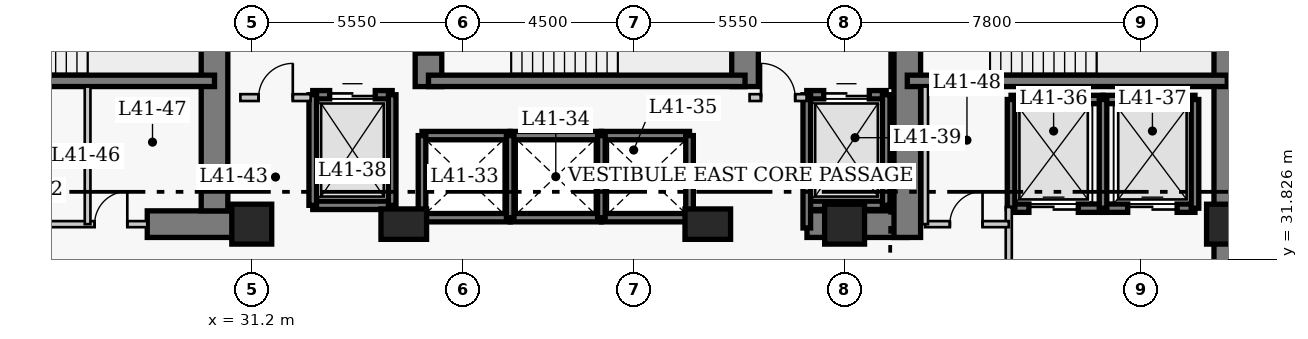
"""IFC4 building model, lengths in metres.
Left out: names, types, materials, properties, quantities, classifications, styles, units other than length and angle.
Written with IfcOpenShell. Run it as: python <this file> out.ifc"""

import sys

from ifc_helpers import new_model, si_unit, direction, frame, frame_2d, origin, origin_2d, place, context, subcontext, project, spatial, rectangle, extrude, element, fill, save


model = new_model("IFC4")
c1 = context("Model", 3, precision=1e-05, world=origin(), true_north=direction((0.0, 1.0)))
c2 = subcontext(c1, "Body", "Model", "MODEL_VIEW")
j1 = project(units=[si_unit("LENGTHUNIT", "METRE"), si_unit("PLANEANGLEUNIT", "RADIAN")], contexts=[c1])
p1 = place(None, origin())
s1 = spatial("IfcSite", under=j1, at=p1, CompositionType="ELEMENT")
p2 = place(p1, origin())
s2 = spatial("IfcBuilding", under=s1, at=p2, CompositionType="ELEMENT")
p3 = place(p2, frame((0.0, 0.0, 165.0)))
s3 = spatial("IfcBuildingStorey", under=s2, at=p3, CompositionType="ELEMENT", Elevation=165.0)
p4 = place(p3, frame((56.87, 27.05, 0.0), z_axis=(0.0, 0.0, 1.0), x_axis=(0.0, 1.0, 0.0)))
e1 = element("IfcWall", 1, at=p4, inside=s3, PredefinedType="SHEAR", context=c2, shape_type="SweptSolid", body=[
    extrude(rectangle(XDim=13.62, YDim=0.7, at=frame_2d((6.81, 0.0))), origin(), (0.0, 0.0, 1.0), 3.8),
])
p5 = place(p3, frame((28.45, 32.75, 0.0), z_axis=(0.0, 0.0, 1.0), x_axis=(1.0, 0.0, 0.0)))
e2 = element("IfcWall", 2, at=p5, inside=s3, PredefinedType="SHEAR", context=c2, shape_type="SweptSolid", body=[
    extrude(rectangle(XDim=2.4, YDim=0.7, at=frame_2d((1.2, 0.0))), origin(), (0.0, 0.0, 1.0), 3.8),
])
p6 = place(p3, frame((45.81, 32.75, 0.0), z_axis=(0.0, 0.0, 1.0), x_axis=(1.0, 0.0, 0.0)))
e3 = element("IfcWall", 3, at=p6, inside=s3, PredefinedType="SHEAR", context=c2, shape_type="SweptSolid", body=[
    extrude(rectangle(XDim=2.64, YDim=0.7, at=frame_2d((1.32, 0.0))), origin(), (0.0, 0.0, 1.0), 3.8),
])
p7 = place(p3, frame((30.22, 33.1, 0.0), z_axis=(0.0, 0.0, 1.0), x_axis=(0.0, 1.0, 0.0)))
e4 = element("IfcWall", 4, at=p7, inside=s3, PredefinedType="SHEAR", context=c2, shape_type="SweptSolid", body=[
    extrude(rectangle(XDim=7.22, YDim=0.7, at=frame_2d((3.61, 0.0))), origin(), (0.0, 0.0, 1.0), 3.8),
])
p8 = place(p3, frame((35.85, 36.37, 0.0), z_axis=(0.0, 0.0, 1.0), x_axis=(0.0, 1.0, 0.0)))
e5 = element("IfcWall", 5, at=p8, inside=s3, PredefinedType="SHEAR", context=c2, shape_type="SweptSolid", body=[
    extrude(rectangle(XDim=3.95, YDim=0.7, at=frame_2d((1.975, 0.0))), origin(), (0.0, 0.0, 1.0), 3.8),
])
p9 = place(p8, frame((0.88, 0.0, 0.0)))
e6 = element("IfcOpeningElement", 6, at=p9, cuts=e5, PredefinedType="OPENING", context=c2, shape_type="SweptSolid", body=[
    extrude(rectangle(XDim=1.1, YDim=2.15, at=frame_2d((0.55, 1.075))), frame((0.0, 0.36, 0.0), z_axis=(0.0, -1.0, 0.0), x_axis=(1.0, 0.0, 0.0)), (0.0, 0.0, 1.0), 0.72),
])
p10 = place(p3, frame((44.18, 36.37, 0.0), z_axis=(0.0, 0.0, 1.0), x_axis=(0.0, 1.0, 0.0)))
e7 = element("IfcWall", 7, at=p10, inside=s3, PredefinedType="SHEAR", context=c2, shape_type="SweptSolid", body=[
    extrude(rectangle(XDim=3.95, YDim=0.7, at=frame_2d((1.975, 0.0))), origin(), (0.0, 0.0, 1.0), 3.8),
])
p11 = place(p3, frame((48.45, 32.4, 0.0), z_axis=(0.0, 0.0, 1.0), x_axis=(0.0, 1.0, 0.0)))
e8 = element("IfcWall", 8, at=p11, inside=s3, PredefinedType="SHEAR", context=c2, shape_type="SweptSolid", body=[
    extrude(rectangle(XDim=7.92, YDim=0.7, at=frame_2d((3.96, 0.0))), origin(), (0.0, 0.0, 1.0), 3.8),
])
p12 = place(p11, frame((5.8, 0.0, 0.0)))
e9 = element("IfcOpeningElement", 9, at=p12, cuts=e8, PredefinedType="OPENING", context=c2, shape_type="SweptSolid", body=[
    extrude(rectangle(XDim=1.1, YDim=2.15, at=frame_2d((0.55, 1.075))), frame((0.0, 0.36, 0.0), z_axis=(0.0, -1.0, 0.0), x_axis=(1.0, 0.0, 0.0)), (0.0, 0.0, 1.0), 0.72),
])
p13 = place(p3, frame((21.9, 36.52, 0.0), z_axis=(0.0, 0.0, 1.0), x_axis=(1.0, 0.0, 0.0)))
e10 = element("IfcWall", 10, at=p13, inside=s3, PredefinedType="SHEAR", context=c2, shape_type="SweptSolid", body=[
    extrude(rectangle(XDim=8.32, YDim=0.3, at=frame_2d((4.16, 0.0))), origin(), (0.0, 0.0, 1.0), 3.8),
])
p14 = place(p13, frame((0.9, 0.0, 0.0)))
e11 = element("IfcOpeningElement", 11, at=p14, cuts=e10, PredefinedType="OPENING", context=c2, shape_type="SweptSolid", body=[
    extrude(rectangle(XDim=1.1, YDim=2.15, at=frame_2d((0.55, 1.075))), frame((0.0, 0.16, 0.0), z_axis=(0.0, -1.0, 0.0), x_axis=(1.0, 0.0, 0.0)), (0.0, 0.0, 1.0), 0.32),
])
p15 = place(p3, frame((35.85, 36.52, 0.0), z_axis=(0.0, 0.0, 1.0), x_axis=(1.0, 0.0, 0.0)))
e12 = element("IfcWall", 12, at=p15, inside=s3, PredefinedType="SHEAR", context=c2, shape_type="SweptSolid", body=[
    extrude(rectangle(XDim=8.33, YDim=0.3, at=frame_2d((4.165, 0.0))), origin(), (0.0, 0.0, 1.0), 3.8),
])
p16 = place(p3, frame((48.45, 36.52, 0.0), z_axis=(0.0, 0.0, 1.0), x_axis=(1.0, 0.0, 0.0)))
e13 = element("IfcWall", 13, at=p16, inside=s3, PredefinedType="SHEAR", context=c2, shape_type="SweptSolid", body=[
    extrude(rectangle(XDim=8.42, YDim=0.3, at=frame_2d((4.21, 0.0))), origin(), (0.0, 0.0, 1.0), 3.8),
])
p17 = place(p3, frame((31.2, 32.75, 0.0), z_axis=(0.0, 0.0, 1.0), x_axis=(1.0, 0.0, 0.0)))
e14 = element("IfcColumn", 14, at=p17, inside=s3, PredefinedType="COLUMN", context=c2, shape_type="SweptSolid", body=[
    extrude(rectangle(XDim=1.05, YDim=1.05, at=origin_2d()), origin(), (0.0, 0.0, 1.0), 3.8),
])
for number, where, z_axis, x_axis in (
    (15, (35.2, 32.75, 0.0), (0.0, 0.0, 1.0), (1.0, 0.0, 0.0)),
    (16, (43.2, 32.75, 0.0), (0.0, 0.0, 1.0), (1.0, 0.0, 0.0)),
):
    element("IfcColumn", number, at=place(p3, frame(where, z_axis=z_axis, x_axis=x_axis)), inside=s3, PredefinedType="COLUMN", context=c2, shape_type="SweptSolid", body=[
        extrude(rectangle(XDim=1.2, YDim=0.8, at=origin_2d()), origin(), (0.0, 0.0, 1.0), 3.8),
    ])
for number, where, z_axis, x_axis in (
    (17, (46.8, 32.75, 0.0), (0.0, 0.0, 1.0), (1.0, 0.0, 0.0)),
    (18, (56.85, 32.75, 0.0), (0.0, 0.0, 1.0), (1.0, 0.0, 0.0)),
):
    element("IfcColumn", number, at=place(p3, frame(where, z_axis=z_axis, x_axis=x_axis)), inside=s3, PredefinedType="COLUMN", context=c2, shape_type="SweptSolid", body=[
        extrude(rectangle(XDim=1.05, YDim=1.05, at=origin_2d()), origin(), (0.0, 0.0, 1.0), 3.8),
    ])
for number, where, z_axis, x_axis in (
    (19, (35.68, 35.08, 0.0), (0.0, 0.0, 1.0), (1.0, 0.0, 0.0)),
    (20, (35.68, 32.92, 0.0), (0.0, 0.0, 1.0), (1.0, 0.0, 0.0)),
):
    element("IfcWall", number, at=place(p3, frame(where, z_axis=z_axis, x_axis=x_axis)), inside=s3, PredefinedType="SHEAR", context=c2, shape_type="SweptSolid", body=[
        extrude(rectangle(XDim=2.32, YDim=0.22, at=frame_2d((1.16, 0.0))), origin(), (0.0, 0.0, 1.0), 3.8),
    ])
p18 = place(p3, frame((35.68, 32.92, 0.0), z_axis=(0.0, 0.0, 1.0), x_axis=(0.0, 1.0, 0.0)))
e21 = element("IfcWall", 21, at=p18, inside=s3, PredefinedType="SHEAR", context=c2, shape_type="SweptSolid", body=[
    extrude(rectangle(XDim=2.16, YDim=0.2, at=frame_2d((1.08, 0.0))), origin(), (0.0, 0.0, 1.0), 3.8),
])
for number, where, z_axis, x_axis in (
    (22, (38.0, 35.08, 0.0), (0.0, 0.0, 1.0), (1.0, 0.0, 0.0)),
    (23, (38.0, 32.92, 0.0), (0.0, 0.0, 1.0), (1.0, 0.0, 0.0)),
):
    element("IfcWall", number, at=place(p3, frame(where, z_axis=z_axis, x_axis=x_axis)), inside=s3, PredefinedType="SHEAR", context=c2, shape_type="SweptSolid", body=[
        extrude(rectangle(XDim=2.4, YDim=0.22, at=frame_2d((1.2, 0.0))), origin(), (0.0, 0.0, 1.0), 3.8),
    ])
p19 = place(p3, frame((38.0, 32.92, 0.0), z_axis=(0.0, 0.0, 1.0), x_axis=(0.0, 1.0, 0.0)))
e24 = element("IfcWall", 24, at=p19, inside=s3, PredefinedType="SHEAR", context=c2, shape_type="SweptSolid", body=[
    extrude(rectangle(XDim=2.16, YDim=0.2, at=frame_2d((1.08, 0.0))), origin(), (0.0, 0.0, 1.0), 3.8),
])
for number, where, z_axis, x_axis in (
    (25, (40.4, 35.08, 0.0), (0.0, 0.0, 1.0), (1.0, 0.0, 0.0)),
    (26, (40.4, 32.92, 0.0), (0.0, 0.0, 1.0), (1.0, 0.0, 0.0)),
):
    element("IfcWall", number, at=place(p3, frame(where, z_axis=z_axis, x_axis=x_axis)), inside=s3, PredefinedType="SHEAR", context=c2, shape_type="SweptSolid", body=[
        extrude(rectangle(XDim=2.32, YDim=0.22, at=frame_2d((1.16, 0.0))), origin(), (0.0, 0.0, 1.0), 3.8),
    ])
for number, where, z_axis, x_axis in (
    (27, (40.4, 32.92, 0.0), (0.0, 0.0, 1.0), (0.0, 1.0, 0.0)),
    (28, (42.72, 32.92, 0.0), (0.0, 0.0, 1.0), (0.0, 1.0, 0.0)),
):
    element("IfcWall", number, at=place(p3, frame(where, z_axis=z_axis, x_axis=x_axis)), inside=s3, PredefinedType="SHEAR", context=c2, shape_type="SweptSolid", body=[
        extrude(rectangle(XDim=2.16, YDim=0.2, at=frame_2d((1.08, 0.0))), origin(), (0.0, 0.0, 1.0), 3.8),
    ])
p20 = place(p3, frame((51.18, 36.03, 0.0), z_axis=(0.0, 0.0, 1.0), x_axis=(1.0, 0.0, 0.0)))
e29 = element("IfcWall", 29, at=p20, inside=s3, PredefinedType="SHEAR", context=c2, shape_type="SweptSolid", body=[
    extrude(rectangle(XDim=2.42, YDim=0.22, at=frame_2d((1.21, 0.0))), origin(), (0.0, 0.0, 1.0), 3.8),
])
p21 = place(p3, frame((51.18, 33.17, 0.0), z_axis=(0.0, 0.0, 1.0), x_axis=(1.0, 0.0, 0.0)))
e30 = element("IfcWall", 30, at=p21, inside=s3, PredefinedType="SHEAR", context=c2, shape_type="SweptSolid", body=[
    extrude(rectangle(XDim=2.42, YDim=0.22, at=frame_2d((1.21, 0.0))), origin(), (0.0, 0.0, 1.0), 3.8),
])
p22 = place(p21, frame((0.47, 0.0, 0.0)))
e31 = element("IfcOpeningElement", 31, at=p22, cuts=e30, PredefinedType="OPENING", context=c2, shape_type="SweptSolid", body=[
    extrude(rectangle(XDim=1.3, YDim=2.15, at=frame_2d((0.65, 1.075))), frame((0.0, 0.12, 0.0), z_axis=(0.0, -1.0, 0.0), x_axis=(1.0, 0.0, 0.0)), (0.0, 0.0, 1.0), 0.24),
])
p23 = place(p3, frame((51.18, 33.17, 0.0), z_axis=(0.0, 0.0, 1.0), x_axis=(0.0, 1.0, 0.0)))
e32 = element("IfcWall", 32, at=p23, inside=s3, PredefinedType="SHEAR", context=c2, shape_type="SweptSolid", body=[
    extrude(rectangle(XDim=2.86, YDim=0.2, at=frame_2d((1.43, 0.0))), origin(), (0.0, 0.0, 1.0), 3.8),
])
p24 = place(p3, frame((53.6, 36.03, 0.0), z_axis=(0.0, 0.0, 1.0), x_axis=(1.0, 0.0, 0.0)))
e33 = element("IfcWall", 33, at=p24, inside=s3, PredefinedType="SHEAR", context=c2, shape_type="SweptSolid", body=[
    extrude(rectangle(XDim=2.42, YDim=0.22, at=frame_2d((1.21, 0.0))), origin(), (0.0, 0.0, 1.0), 3.8),
])
p25 = place(p3, frame((53.6, 33.17, 0.0), z_axis=(0.0, 0.0, 1.0), x_axis=(1.0, 0.0, 0.0)))
e34 = element("IfcWall", 34, at=p25, inside=s3, PredefinedType="SHEAR", context=c2, shape_type="SweptSolid", body=[
    extrude(rectangle(XDim=2.42, YDim=0.22, at=frame_2d((1.21, 0.0))), origin(), (0.0, 0.0, 1.0), 3.8),
])
p26 = place(p25, frame((0.65, 0.0, 0.0)))
e35 = element("IfcOpeningElement", 35, at=p26, cuts=e34, PredefinedType="OPENING", context=c2, shape_type="SweptSolid", body=[
    extrude(rectangle(XDim=1.3, YDim=2.15, at=frame_2d((0.65, 1.075))), frame((0.0, 0.12, 0.0), z_axis=(0.0, -1.0, 0.0), x_axis=(1.0, 0.0, 0.0)), (0.0, 0.0, 1.0), 0.24),
])
for number, where, z_axis, x_axis in (
    (36, (53.6, 33.17, 0.0), (0.0, 0.0, 1.0), (0.0, 1.0, 0.0)),
    (37, (56.02, 33.17, 0.0), (0.0, 0.0, 1.0), (0.0, 1.0, 0.0)),
):
    element("IfcWall", number, at=place(p3, frame(where, z_axis=z_axis, x_axis=x_axis)), inside=s3, PredefinedType="SHEAR", context=c2, shape_type="SweptSolid", body=[
        extrude(rectangle(XDim=2.86, YDim=0.2, at=frame_2d((1.43, 0.0))), origin(), (0.0, 0.0, 1.0), 3.8),
    ])
p27 = place(p3, frame((32.805, 36.155, 0.0), z_axis=(0.0, 0.0, 1.0), x_axis=(1.0, 0.0, 0.0)))
e38 = element("IfcWall", 38, at=p27, inside=s3, PredefinedType="SHEAR", context=c2, shape_type="SweptSolid", body=[
    extrude(rectangle(XDim=2.09, YDim=0.22, at=frame_2d((1.045, 0.0))), origin(), (0.0, 0.0, 1.0), 3.8),
])
p28 = place(p27, frame((0.445, 0.0, 0.0)))
e39 = element("IfcOpeningElement", 39, at=p28, cuts=e38, PredefinedType="OPENING", context=c2, shape_type="SweptSolid", body=[
    extrude(rectangle(XDim=1.2, YDim=2.15, at=frame_2d((0.6, 1.075))), frame((0.0, 0.12, 0.0), z_axis=(0.0, -1.0, 0.0), x_axis=(1.0, 0.0, 0.0)), (0.0, 0.0, 1.0), 0.24),
])
p29 = place(p3, frame((32.805, 33.245, 0.0), z_axis=(0.0, 0.0, 1.0), x_axis=(1.0, 0.0, 0.0)))
e40 = element("IfcWall", 40, at=p29, inside=s3, PredefinedType="SHEAR", context=c2, shape_type="SweptSolid", body=[
    extrude(rectangle(XDim=2.09, YDim=0.22, at=frame_2d((1.045, 0.0))), origin(), (0.0, 0.0, 1.0), 3.8),
])
for number, where, z_axis, x_axis in (
    (41, (32.805, 33.245, 0.0), (0.0, 0.0, 1.0), (0.0, 1.0, 0.0)),
    (42, (34.895, 33.245, 0.0), (0.0, 0.0, 1.0), (0.0, 1.0, 0.0)),
):
    element("IfcWall", number, at=place(p3, frame(where, z_axis=z_axis, x_axis=x_axis)), inside=s3, PredefinedType="SHEAR", context=c2, shape_type="SweptSolid", body=[
        extrude(rectangle(XDim=2.91, YDim=0.2, at=frame_2d((1.455, 0.0))), origin(), (0.0, 0.0, 1.0), 3.8),
    ])
p30 = place(p3, frame((45.805, 36.155, 0.0), z_axis=(0.0, 0.0, 1.0), x_axis=(1.0, 0.0, 0.0)))
e43 = element("IfcWall", 43, at=p30, inside=s3, PredefinedType="SHEAR", context=c2, shape_type="SweptSolid", body=[
    extrude(rectangle(XDim=2.09, YDim=0.22, at=frame_2d((1.045, 0.0))), origin(), (0.0, 0.0, 1.0), 3.8),
])
p31 = place(p30, frame((0.445, 0.0, 0.0)))
e44 = element("IfcOpeningElement", 44, at=p31, cuts=e43, PredefinedType="OPENING", context=c2, shape_type="SweptSolid", body=[
    extrude(rectangle(XDim=1.2, YDim=2.15, at=frame_2d((0.6, 1.075))), frame((0.0, 0.12, 0.0), z_axis=(0.0, -1.0, 0.0), x_axis=(1.0, 0.0, 0.0)), (0.0, 0.0, 1.0), 0.24),
])
p32 = place(p3, frame((45.805, 33.245, 0.0), z_axis=(0.0, 0.0, 1.0), x_axis=(1.0, 0.0, 0.0)))
e45 = element("IfcWall", 45, at=p32, inside=s3, PredefinedType="SHEAR", context=c2, shape_type="SweptSolid", body=[
    extrude(rectangle(XDim=2.09, YDim=0.22, at=frame_2d((1.045, 0.0))), origin(), (0.0, 0.0, 1.0), 3.8),
])
p33 = place(p3, frame((45.805, 32.65, 0.0), z_axis=(0.0, 0.0, 1.0), x_axis=(0.0, 1.0, 0.0)))
e46 = element("IfcWall", 46, at=p33, inside=s3, PredefinedType="SHEAR", context=c2, shape_type="SweptSolid", body=[
    extrude(rectangle(XDim=3.505, YDim=0.2, at=frame_2d((1.752, 0.0))), origin(), (0.0, 0.0, 1.0), 3.8),
])
p34 = place(p3, frame((47.895, 33.245, 0.0), z_axis=(0.0, 0.0, 1.0), x_axis=(0.0, 1.0, 0.0)))
e47 = element("IfcWall", 47, at=p34, inside=s3, PredefinedType="SHEAR", context=c2, shape_type="SweptSolid", body=[
    extrude(rectangle(XDim=2.91, YDim=0.2, at=frame_2d((1.455, 0.0))), origin(), (0.0, 0.0, 1.0), 3.8),
])
p35 = place(p3, frame((30.9, 36.08, 0.0), z_axis=(0.0, 0.0, 1.0), x_axis=(1.0, 0.0, 0.0)))
e48 = element("IfcWall", 48, at=p35, inside=s3, PredefinedType="PARTITIONING", context=c2, shape_type="SweptSolid", body=[
    extrude(rectangle(XDim=1.85, YDim=0.18, at=frame_2d((0.925, 0.0))), origin(), (0.0, 0.0, 1.0), 3.55),
])
p36 = place(p35, frame((0.48, 0.0, 0.0)))
e49 = element("IfcOpeningElement", 49, at=p36, cuts=e48, PredefinedType="OPENING", context=c2, shape_type="SweptSolid", body=[
    extrude(rectangle(XDim=0.9, YDim=2.15, at=frame_2d((0.45, 1.075))), frame((0.0, 0.1, 0.0), z_axis=(0.0, -1.0, 0.0), x_axis=(1.0, 0.0, 0.0)), (0.0, 0.0, 1.0), 0.2),
])
p37 = place(p3, frame((44.3, 36.08, 0.0), z_axis=(0.0, 0.0, 1.0), x_axis=(1.0, 0.0, 0.0)))
e50 = element("IfcWall", 50, at=p37, inside=s3, PredefinedType="PARTITIONING", context=c2, shape_type="SweptSolid", body=[
    extrude(rectangle(XDim=1.5, YDim=0.18, at=frame_2d((0.75, 0.0))), origin(), (0.0, 0.0, 1.0), 3.55),
])
p38 = place(p37, frame((0.3, 0.0, 0.0)))
e51 = element("IfcOpeningElement", 51, at=p38, cuts=e50, PredefinedType="OPENING", context=c2, shape_type="SweptSolid", body=[
    extrude(rectangle(XDim=0.9, YDim=2.15, at=frame_2d((0.45, 1.075))), frame((0.0, 0.1, 0.0), z_axis=(0.0, -1.0, 0.0), x_axis=(1.0, 0.0, 0.0)), (0.0, 0.0, 1.0), 0.2),
])
p39 = place(p3, frame((51.12, 29.5, 0.0), z_axis=(0.0, 0.0, 1.0), x_axis=(0.0, 1.0, 0.0)))
e52 = element("IfcWall", 52, at=p39, inside=s3, PredefinedType="PARTITIONING", context=c2, shape_type="SweptSolid", body=[
    extrude(rectangle(XDim=3.7, YDim=0.16, at=frame_2d((1.85, 0.0))), origin(), (0.0, 0.0, 1.0), 3.55),
])
p40 = place(p39, frame((0.9, 0.0, 0.0)))
e53 = element("IfcOpeningElement", 53, at=p40, cuts=e52, PredefinedType="OPENING", context=c2, shape_type="SweptSolid", body=[
    extrude(rectangle(XDim=1.1, YDim=2.15, at=frame_2d((0.55, 1.075))), frame((0.0, 0.09, 0.0), z_axis=(0.0, -1.0, 0.0), x_axis=(1.0, 0.0, 0.0)), (0.0, 0.0, 1.0), 0.18),
])
p41 = place(p3, frame((24.48, 32.75, 0.0), z_axis=(0.0, 0.0, 1.0), x_axis=(1.0, 0.0, 0.0)))
e54 = element("IfcWall", 54, at=p41, inside=s3, PredefinedType="PARTITIONING", context=c2, shape_type="SweptSolid", body=[
    extrude(rectangle(XDim=3.97, YDim=0.16, at=frame_2d((1.985, 0.0))), origin(), (0.0, 0.0, 1.0), 3.55),
])
p42 = place(p41, frame((2.585, 0.0, 0.0)))
e55 = element("IfcOpeningElement", 55, at=p42, cuts=e54, PredefinedType="OPENING", context=c2, shape_type="SweptSolid", body=[
    extrude(rectangle(XDim=0.86, YDim=2.05, at=frame_2d((0.43, 1.025))), frame((0.0, 0.09, 0.0), z_axis=(0.0, -1.0, 0.0), x_axis=(1.0, 0.0, 0.0)), (0.0, 0.0, 1.0), 0.18),
])
p43 = place(p3, frame((48.92, 32.75, 0.0), z_axis=(0.0, 0.0, 1.0), x_axis=(1.0, 0.0, 0.0)))
e56 = element("IfcWall", 56, at=p43, inside=s3, PredefinedType="PARTITIONING", context=c2, shape_type="SweptSolid", body=[
    extrude(rectangle(XDim=2.2, YDim=0.16, at=frame_2d((1.1, 0.0))), origin(), (0.0, 0.0, 1.0), 3.55),
])
p44 = place(p43, frame((0.65, 0.0, 0.0)))
e57 = element("IfcOpeningElement", 57, at=p44, cuts=e56, PredefinedType="OPENING", context=c2, shape_type="SweptSolid", body=[
    extrude(rectangle(XDim=0.86, YDim=2.05, at=frame_2d((0.43, 1.025))), frame((0.0, 0.09, 0.0), z_axis=(0.0, -1.0, 0.0), x_axis=(1.0, 0.0, 0.0)), (0.0, 0.0, 1.0), 0.18),
])
for number, where, z_axis, x_axis in (
    (58, (48.92, 32.75, 0.0), (0.0, 0.0, 1.0), (0.0, 1.0, 0.0)),
    (59, (26.88, 32.75, 0.0), (0.0, 0.0, 1.0), (0.0, 1.0, 0.0)),
):
    element("IfcWall", number, at=place(p3, frame(where, z_axis=z_axis, x_axis=x_axis)), inside=s3, PredefinedType="PARTITIONING", context=c2, shape_type="SweptSolid", body=[
        extrude(rectangle(XDim=3.62, YDim=0.15, at=frame_2d((1.81, 0.0))), origin(), (0.0, 0.0, 1.0), 3.55),
    ])
p45 = place(p22, origin())
e60 = element("IfcDoor", 60, at=p45, inside=s3, OperationType="DOUBLE_DOOR_SLIDING", PredefinedType="DOOR", context=c2, shape_type="SweptSolid", body=[
    extrude(rectangle(XDim=1.3, YDim=2.15, at=frame_2d((0.65, 1.075))), frame((0.0, 0.025, 0.0), z_axis=(0.0, -1.0, 0.0), x_axis=(1.0, 0.0, 0.0)), (0.0, 0.0, 1.0), 0.05),
])
fill(e31, e60)
p46 = place(p26, origin())
e61 = element("IfcDoor", 61, at=p46, inside=s3, OperationType="DOUBLE_DOOR_SLIDING", PredefinedType="DOOR", context=c2, shape_type="SweptSolid", body=[
    extrude(rectangle(XDim=1.3, YDim=2.15, at=frame_2d((0.65, 1.075))), frame((0.0, 0.025, 0.0), z_axis=(0.0, -1.0, 0.0), x_axis=(1.0, 0.0, 0.0)), (0.0, 0.0, 1.0), 0.05),
])
fill(e35, e61)
p47 = place(p28, origin())
e62 = element("IfcDoor", 62, at=p47, inside=s3, OperationType="DOUBLE_DOOR_SLIDING", PredefinedType="DOOR", context=c2, shape_type="SweptSolid", body=[
    extrude(rectangle(XDim=1.2, YDim=2.15, at=frame_2d((0.6, 1.075))), frame((0.0, 0.025, 0.0), z_axis=(0.0, -1.0, 0.0), x_axis=(1.0, 0.0, 0.0)), (0.0, 0.0, 1.0), 0.05),
])
fill(e39, e62)
p48 = place(p31, origin())
e63 = element("IfcDoor", 63, at=p48, inside=s3, OperationType="DOUBLE_DOOR_SLIDING", PredefinedType="DOOR", context=c2, shape_type="SweptSolid", body=[
    extrude(rectangle(XDim=1.2, YDim=2.15, at=frame_2d((0.6, 1.075))), frame((0.0, 0.025, 0.0), z_axis=(0.0, -1.0, 0.0), x_axis=(1.0, 0.0, 0.0)), (0.0, 0.0, 1.0), 0.05),
])
fill(e44, e63)
p49 = place(p36, origin())
e64 = element("IfcDoor", 64, at=p49, inside=s3, OperationType="SINGLE_SWING_RIGHT", PredefinedType="DOOR", context=c2, shape_type="SweptSolid", body=[
    extrude(rectangle(XDim=0.9, YDim=2.15, at=frame_2d((0.45, 1.075))), frame((0.0, 0.025, 0.0), z_axis=(0.0, -1.0, 0.0), x_axis=(1.0, 0.0, 0.0)), (0.0, 0.0, 1.0), 0.05),
])
fill(e49, e64)
p50 = place(p38, origin())
e65 = element("IfcDoor", 65, at=p50, inside=s3, OperationType="SINGLE_SWING_LEFT", PredefinedType="DOOR", context=c2, shape_type="SweptSolid", body=[
    extrude(rectangle(XDim=0.9, YDim=2.15, at=frame_2d((0.45, 1.075))), frame((0.0, 0.025, 0.0), z_axis=(0.0, -1.0, 0.0), x_axis=(1.0, 0.0, 0.0)), (0.0, 0.0, 1.0), 0.05),
])
fill(e51, e65)
p51 = place(p42, origin())
e66 = element("IfcDoor", 66, at=p51, inside=s3, OperationType="SINGLE_SWING_RIGHT", PredefinedType="DOOR", context=c2, shape_type="SweptSolid", body=[
    extrude(rectangle(XDim=0.86, YDim=2.05, at=frame_2d((0.43, 1.025))), frame((0.0, 0.025, 0.0), z_axis=(0.0, -1.0, 0.0), x_axis=(1.0, 0.0, 0.0)), (0.0, 0.0, 1.0), 0.05),
])
fill(e55, e66)
p52 = place(p44, origin())
e67 = element("IfcDoor", 67, at=p52, inside=s3, OperationType="SINGLE_SWING_RIGHT", PredefinedType="DOOR", context=c2, shape_type="SweptSolid", body=[
    extrude(rectangle(XDim=0.86, YDim=2.05, at=frame_2d((0.43, 1.025))), frame((0.0, 0.025, 0.0), z_axis=(0.0, -1.0, 0.0), x_axis=(1.0, 0.0, 0.0)), (0.0, 0.0, 1.0), 0.05),
])
fill(e57, e67)
p53 = place(p9, origin())
e68 = element("IfcDoor", 68, at=p53, inside=s3, OperationType="SINGLE_SWING_RIGHT", PredefinedType="DOOR", context=c2, shape_type="SweptSolid", body=[
    extrude(rectangle(XDim=1.1, YDim=2.15, at=frame_2d((0.55, 1.075))), frame((0.0, 0.025, 0.0), z_axis=(0.0, -1.0, 0.0), x_axis=(1.0, 0.0, 0.0)), (0.0, 0.0, 1.0), 0.05),
])
fill(e6, e68)
save(model, sys.argv[1])
